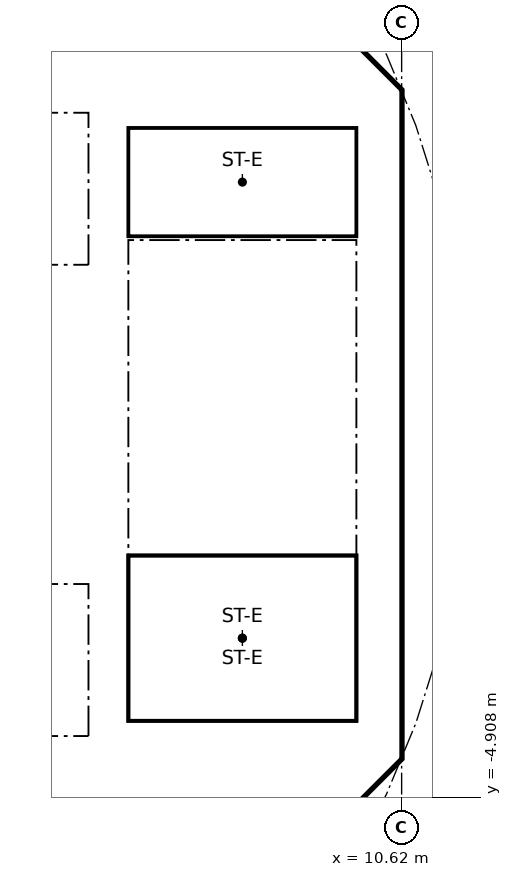
"""IFC4 building model, lengths in metres.
Left out: names, types, materials, properties, quantities, classifications, styles, units other than length and angle.
Written with IfcOpenShell. Run it as: python <this file> out.ifc"""

import sys

from ifc_helpers import new_model, si_unit, direction, frame, frame_2d, origin, place, context, subcontext, project, spatial, polyline, rectangle, outline, extrude, element, fill, save


model = new_model("IFC4")
c1 = context("Model", 3, precision=1e-05, world=origin(), true_north=direction((0.0, 1.0)))
c2 = subcontext(c1, "Body", "Model", "MODEL_VIEW")
j1 = project(units=[si_unit("LENGTHUNIT", "METRE"), si_unit("PLANEANGLEUNIT", "RADIAN")], contexts=[c1])
p1 = place(None, origin())
s1 = spatial("IfcSite", under=j1, at=p1, CompositionType="ELEMENT")
p2 = place(p1, origin())
s2 = spatial("IfcBuilding", under=s1, at=p2, CompositionType="ELEMENT")
p3 = place(p2, frame((0.0, 0.0, 299.2)))
s3 = spatial("IfcBuildingStorey", under=s2, at=p3, CompositionType="ELEMENT", Elevation=299.2)
p4 = place(p3, frame((9.988, 4.613, 0.0), z_axis=(0.0, 0.0, 1.0), x_axis=(-0.707106781187, 0.707106781187, 0.0)))
e1 = element("IfcWall", 1, at=p4, inside=s3, PredefinedType="SHEAR", context=c2, shape_type="SweptSolid", body=[
    extrude(rectangle(XDim=7.602, YDim=0.6, at=frame_2d((3.801, 0.0))), origin(), (0.0, 0.0, 1.0), 10.75),
])
p5 = place(p4, frame((3.201, 0.0, 0.0)))
e2 = element("IfcOpeningElement", 2, at=p5, cuts=e1, PredefinedType="OPENING", context=c2, shape_type="SweptSolid", body=[
    extrude(rectangle(XDim=1.2, YDim=2.1, at=frame_2d((0.6, 1.05))), frame((0.0, 0.31, 0.0), z_axis=(0.0, -1.0, 0.0), x_axis=(1.0, 0.0, 0.0)), (0.0, 0.0, 1.0), 0.62),
])
p6 = place(p3, frame((4.613, -9.988, 0.0), z_axis=(0.0, 0.0, 1.0), x_axis=(0.707106781187, 0.707106781187, 0.0)))
e3 = element("IfcWall", 3, at=p6, inside=s3, PredefinedType="SHEAR", context=c2, shape_type="SweptSolid", body=[
    extrude(rectangle(XDim=7.602, YDim=0.6, at=frame_2d((3.801, 0.0))), origin(), (0.0, 0.0, 1.0), 10.75),
])
p7 = place(p6, frame((3.201, 0.0, 0.0)))
e4 = element("IfcOpeningElement", 4, at=p7, cuts=e3, PredefinedType="OPENING", context=c2, shape_type="SweptSolid", body=[
    extrude(rectangle(XDim=1.2, YDim=2.1, at=frame_2d((0.6, 1.05))), frame((0.0, 0.31, 0.0), z_axis=(0.0, -1.0, 0.0), x_axis=(1.0, 0.0, 0.0)), (0.0, 0.0, 1.0), 0.62),
])
p8 = place(p3, frame((-6.7, 2.0, 0.0), z_axis=(0.0, 0.0, 1.0), x_axis=(1.0, 0.0, 0.0)))
e5 = element("IfcWall", 5, at=p8, inside=s3, PredefinedType="SOLIDWALL", context=c2, shape_type="SweptSolid", body=[
    extrude(rectangle(XDim=13.4, YDim=0.2, at=frame_2d((6.7, 0.0))), origin(), (0.0, 0.0, 1.0), 10.75),
])
p9 = place(p8, frame((11.65, 0.0, 0.0)))
e6 = element("IfcOpeningElement", 6, at=p9, cuts=e5, PredefinedType="OPENING", context=c2, shape_type="SweptSolid", body=[
    extrude(rectangle(XDim=1.1, YDim=2.1, at=frame_2d((0.55, 1.05))), frame((0.0, 0.11, 0.0), z_axis=(0.0, -1.0, 0.0), x_axis=(1.0, 0.0, 0.0)), (0.0, 0.0, 1.0), 0.22),
])
p10 = place(p8, frame((0.75, 0.0, 0.0)))
e7 = element("IfcOpeningElement", 7, at=p10, cuts=e5, PredefinedType="OPENING", context=c2, shape_type="SweptSolid", body=[
    extrude(rectangle(XDim=0.9, YDim=2.1, at=frame_2d((0.45, 1.05))), frame((0.0, 0.11, 0.0), z_axis=(0.0, -1.0, 0.0), x_axis=(1.0, 0.0, 0.0)), (0.0, 0.0, 1.0), 0.22),
])
p11 = place(p8, frame((4.05, 0.0, 0.0)))
e8 = element("IfcOpeningElement", 8, at=p11, cuts=e5, PredefinedType="OPENING", context=c2, shape_type="SweptSolid", body=[
    extrude(rectangle(XDim=0.9, YDim=2.1, at=frame_2d((0.45, 1.05))), frame((0.0, 0.11, 0.0), z_axis=(0.0, -1.0, 0.0), x_axis=(1.0, 0.0, 0.0)), (0.0, 0.0, 1.0), 0.22),
])
p12 = place(p8, frame((7.35, 0.0, 0.0)))
e9 = element("IfcOpeningElement", 9, at=p12, cuts=e5, PredefinedType="OPENING", context=c2, shape_type="SweptSolid", body=[
    extrude(rectangle(XDim=0.9, YDim=2.1, at=frame_2d((0.45, 1.05))), frame((0.0, 0.11, 0.0), z_axis=(0.0, -1.0, 0.0), x_axis=(1.0, 0.0, 0.0)), (0.0, 0.0, 1.0), 0.22),
])
p13 = place(p8, frame((9.55, 0.0, 0.0)))
e10 = element("IfcOpeningElement", 10, at=p13, cuts=e5, PredefinedType="OPENING", context=c2, shape_type="SweptSolid", body=[
    extrude(rectangle(XDim=0.9, YDim=2.1, at=frame_2d((0.45, 1.05))), frame((0.0, 0.11, 0.0), z_axis=(0.0, -1.0, 0.0), x_axis=(1.0, 0.0, 0.0)), (0.0, 0.0, 1.0), 0.22),
])
p14 = place(p3, frame((6.7, 4.0, 0.0), z_axis=(0.0, 0.0, 1.0), x_axis=(1.0, 0.0, 0.0)))
e11 = element("IfcWall", 11, at=p14, inside=s3, PredefinedType="SOLIDWALL", context=c2, shape_type="SweptSolid", body=[
    extrude(rectangle(XDim=3.325, YDim=0.2, at=frame_2d((1.662, 0.0))), origin(), (0.0, 0.0, 1.0), 10.75),
])
p15 = place(p14, frame((1.25, 0.0, 0.0)))
e12 = element("IfcOpeningElement", 12, at=p15, cuts=e11, PredefinedType="OPENING", context=c2, shape_type="SweptSolid", body=[
    extrude(rectangle(XDim=1.1, YDim=2.1, at=frame_2d((0.55, 1.05))), frame((0.0, 0.11, 0.0), z_axis=(0.0, -1.0, 0.0), x_axis=(1.0, 0.0, 0.0)), (0.0, 0.0, 1.0), 0.22),
])
p16 = place(p3, frame((-6.7, -2.0, 0.0), z_axis=(0.0, 0.0, 1.0), x_axis=(1.0, 0.0, 0.0)))
e13 = element("IfcWall", 13, at=p16, inside=s3, PredefinedType="SOLIDWALL", context=c2, shape_type="SweptSolid", body=[
    extrude(rectangle(XDim=13.4, YDim=0.2, at=frame_2d((6.7, 0.0))), origin(), (0.0, 0.0, 1.0), 10.75),
])
p17 = place(p16, frame((9.45, 0.0, 0.0)))
e14 = element("IfcOpeningElement", 14, at=p17, cuts=e13, PredefinedType="OPENING", context=c2, shape_type="SweptSolid", body=[
    extrude(rectangle(XDim=1.1, YDim=2.1, at=frame_2d((0.55, 1.05))), frame((0.0, 0.11, 0.0), z_axis=(0.0, -1.0, 0.0), x_axis=(1.0, 0.0, 0.0)), (0.0, 0.0, 1.0), 0.22),
])
p18 = place(p16, frame((11.65, 0.0, 0.0)))
e15 = element("IfcOpeningElement", 15, at=p18, cuts=e13, PredefinedType="OPENING", context=c2, shape_type="SweptSolid", body=[
    extrude(rectangle(XDim=1.1, YDim=2.1, at=frame_2d((0.55, 1.05))), frame((0.0, 0.11, 0.0), z_axis=(0.0, -1.0, 0.0), x_axis=(1.0, 0.0, 0.0)), (0.0, 0.0, 1.0), 0.22),
])
p19 = place(p16, frame((1.85, 0.0, 0.0)))
e16 = element("IfcOpeningElement", 16, at=p19, cuts=e13, PredefinedType="OPENING", context=c2, shape_type="SweptSolid", body=[
    extrude(rectangle(XDim=0.9, YDim=2.1, at=frame_2d((0.45, 1.05))), frame((0.0, 0.11, 0.0), z_axis=(0.0, -1.0, 0.0), x_axis=(1.0, 0.0, 0.0)), (0.0, 0.0, 1.0), 0.22),
])
p20 = place(p16, frame((6.25, 0.0, 0.0)))
e17 = element("IfcOpeningElement", 17, at=p20, cuts=e13, PredefinedType="OPENING", context=c2, shape_type="SweptSolid", body=[
    extrude(rectangle(XDim=0.9, YDim=2.1, at=frame_2d((0.45, 1.05))), frame((0.0, 0.11, 0.0), z_axis=(0.0, -1.0, 0.0), x_axis=(1.0, 0.0, 0.0)), (0.0, 0.0, 1.0), 0.22),
])
p21 = place(p3, origin())
e18 = element("IfcWall", 18, at=p21, inside=s3, PredefinedType="SHEAR", context=c2, shape_type="SweptSolid", body=[
    extrude(outline(polyline([(9.776, -4.401), (10.025, -4.152), (10.025, -3.801), (10.025, 4.152), (9.776, 4.401), (10.2, 4.825), (10.625, 4.401), (10.625, -4.401), (10.2, -4.825), (9.776, -4.401)])), origin(), (0.0, 0.0, 1.0), 10.75),
])
p22 = place(p3, origin())
e19 = element("IfcWall", 19, at=p22, inside=s3, PredefinedType="SOLIDWALL", context=c2, shape_type="SweptSolid", body=[
    extrude(outline(polyline([(-6.7, 4.3), (6.7, 4.3), (6.7, 2.1), (6.5, 2.1), (6.5, 4.1), (4.5, 4.1), (4.5, 2.1), (4.3, 2.1), (4.3, 4.1), (2.3, 4.1), (2.3, 2.1), (2.1, 2.1), (2.1, 4.1), (0.1, 4.1), (0.1, 2.1), (-0.1, 2.1), (-0.1, 4.1), (-4.3, 4.1), (-4.3, 2.1), (-4.5, 2.1), (-4.5, 4.1), (-6.5, 4.1), (-6.5, 2.1), (-6.7, 2.1), (-6.7, 4.3)])), origin(), (0.0, 0.0, 1.0), 10.75),
])
p23 = place(p3, origin())
e20 = element("IfcWall", 20, at=p23, inside=s3, PredefinedType="SOLIDWALL", context=c2, shape_type="SweptSolid", body=[
    extrude(outline(polyline([(-6.7, -2.1), (-6.5, -2.1), (-6.5, -4.1), (-2.3, -4.1), (-2.3, -2.1), (-2.1, -2.1), (-2.1, -4.1), (2.1, -4.1), (2.1, -2.1), (2.3, -2.1), (2.3, -4.1), (4.3, -4.1), (4.3, -2.1), (4.5, -2.1), (4.5, -4.1), (6.5, -4.1), (6.5, -2.1), (6.7, -2.1), (6.7, -4.3), (-6.7, -4.3), (-6.7, -2.1)])), origin(), (0.0, 0.0, 1.0), 10.75),
])
p24 = place(p3, origin())
e21 = element("IfcWall", 21, at=p24, inside=s3, PredefinedType="SOLIDWALL", context=c2, shape_type="SweptSolid", body=[
    extrude(outline(polyline([(7.025, -3.9), (6.7, -3.9), (6.7, 3.9), (7.025, 3.9), (7.025, -3.9)])), origin(), (0.0, 0.0, 1.0), 10.75),
])
p25 = place(p3, origin())
e22 = element("IfcWall", 22, at=p25, inside=s3, PredefinedType="SOLIDWALL", context=c2, shape_type="SweptSolid", body=[
    extrude(outline(polyline([(10.025, -4.1), (6.7, -4.1), (6.7, -3.9), (10.025, -3.9), (10.025, -4.1)])), origin(), (0.0, 0.0, 1.0), 10.75),
])
p26 = place(p9, origin())
e23 = element("IfcDoor", 23, at=p26, inside=s3, OperationType="DOUBLE_DOOR_SLIDING", PredefinedType="DOOR", context=c2, shape_type="SweptSolid", body=[
    extrude(rectangle(XDim=1.1, YDim=2.1, at=frame_2d((0.55, 1.05))), frame((0.0, 0.025, 0.0), z_axis=(0.0, -1.0, 0.0), x_axis=(1.0, 0.0, 0.0)), (0.0, 0.0, 1.0), 0.05),
])
fill(e6, e23)
p27 = place(p18, origin())
e24 = element("IfcDoor", 24, at=p27, inside=s3, OperationType="DOUBLE_DOOR_SLIDING", PredefinedType="DOOR", context=c2, shape_type="SweptSolid", body=[
    extrude(rectangle(XDim=1.1, YDim=2.1, at=frame_2d((0.55, 1.05))), frame((0.0, 0.025, 0.0), z_axis=(0.0, -1.0, 0.0), x_axis=(1.0, 0.0, 0.0)), (0.0, 0.0, 1.0), 0.05),
])
fill(e15, e24)
p28 = place(p15, frame((1.1, 0.0, 0.0), x_axis=(-1.0, 0.0, 0.0)))
e25 = element("IfcDoor", 25, at=p28, inside=s3, OperationType="SINGLE_SWING_LEFT", PredefinedType="DOOR", context=c2, shape_type="SweptSolid", body=[
    extrude(rectangle(XDim=1.1, YDim=2.1, at=frame_2d((0.55, 1.05))), frame((0.0, 0.025, 0.0), z_axis=(0.0, -1.0, 0.0), x_axis=(1.0, 0.0, 0.0)), (0.0, 0.0, 1.0), 0.05),
])
fill(e12, e25)
save(model, sys.argv[1])
